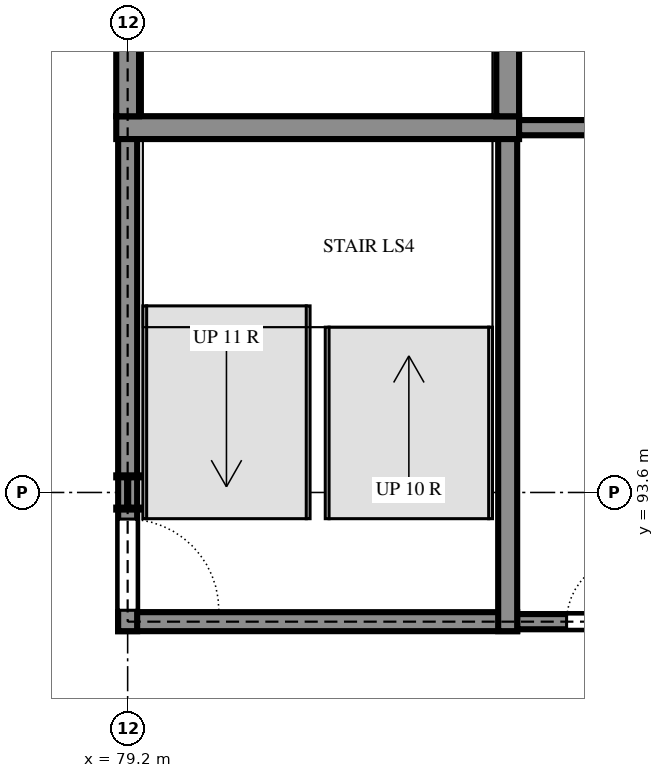
"""IFC4 building model, lengths in metres.
Left out: names, types, materials, properties, quantities, classifications, styles, units other than length and angle.
Written with IfcOpenShell. Run it as: python <this file> out.ifc"""

import sys

from ifc_helpers import new_model, si_unit, direction, frame, frame_2d, origin, origin_2d, place, context, subcontext, project, spatial, rectangle, i_section, extrude, element, fill, save


model = new_model("IFC4")
c1 = context("Model", 3, precision=1e-05, world=origin(), true_north=direction((0.0, 1.0)))
c2 = subcontext(c1, "Body", "Model", "MODEL_VIEW")
j1 = project(units=[si_unit("LENGTHUNIT", "METRE"), si_unit("PLANEANGLEUNIT", "RADIAN")], contexts=[c1])
p1 = place(None, origin())
s1 = spatial("IfcSite", under=j1, at=p1, CompositionType="ELEMENT")
p2 = place(p1, origin())
s2 = spatial("IfcBuilding", under=s1, at=p2, CompositionType="ELEMENT")
p3 = place(p2, frame((0.0, 0.0, 7.2)))
s3 = spatial("IfcBuildingStorey", under=s2, at=p3, CompositionType="ELEMENT", Elevation=7.2)
p4 = place(p3, frame((79.2, 93.6, 0.0), z_axis=(0.0, 0.0, 1.0), x_axis=(1.0, 0.0, 0.0)))
e1 = element("IfcColumn", 1, at=p4, inside=s3, PredefinedType="COLUMN", context=c2, shape_type="SweptSolid", body=[
    extrude(i_section(OverallWidth=0.3, OverallDepth=0.45, WebThickness=0.014, FlangeThickness=0.026, FilletRadius=0.027, at=origin_2d()), origin(), (0.0, 0.0, 1.0), 3.6),
])
p5 = place(p3, frame((79.075, 91.9, 0.0), z_axis=(0.0, 0.0, 1.0), x_axis=(1.0, 0.0, 0.0)))
e2 = element("IfcWall", 2, at=p5, inside=s3, PredefinedType="SHEAR", context=c2, shape_type="SweptSolid", body=[
    extrude(rectangle(XDim=5.25, YDim=0.25, at=frame_2d((2.625, 0.0))), origin(), (0.0, 0.0, 1.0), 3.6),
])
p6 = place(p3, frame((84.325, 91.9, 0.0), z_axis=(0.0, 0.0, 1.0), x_axis=(1.0, 0.0, 0.0)))
e3 = element("IfcWall", 3, at=p6, inside=s3, PredefinedType="SHEAR", context=c2, shape_type="SweptSolid", body=[
    extrude(rectangle(XDim=2.175, YDim=0.2, at=frame_2d((1.087, 0.0))), origin(), (0.0, 0.0, 1.0), 3.6),
])
p7 = place(p6, frame((0.65, 0.0, 0.0)))
e4 = element("IfcOpeningElement", 4, at=p7, cuts=e3, PredefinedType="OPENING", context=c2, shape_type="SweptSolid", body=[
    extrude(rectangle(XDim=0.85, YDim=2.1, at=frame_2d((0.425, 1.05))), frame((0.0, 0.11, 0.0), z_axis=(0.0, -1.0, 0.0), x_axis=(1.0, 0.0, 0.0)), (0.0, 0.0, 1.0), 0.22),
])
p8 = place(p3, frame((84.2, 91.775, 0.0), z_axis=(0.0, 0.0, 1.0), x_axis=(0.0, 1.0, 0.0)))
e5 = element("IfcWall", 5, at=p8, inside=s3, PredefinedType="SHEAR", context=c2, shape_type="SweptSolid", body=[
    extrude(rectangle(XDim=6.775, YDim=0.25, at=frame_2d((3.388, 0.0))), origin(), (0.0, 0.0, 1.0), 3.6),
])
p9 = place(p3, frame((79.2, 98.55, 0.0), z_axis=(0.0, 0.0, 1.0), x_axis=(0.0, -1.0, 0.0)))
e6 = element("IfcWall", 6, at=p9, inside=s3, PredefinedType="SHEAR", context=c2, shape_type="SweptSolid", body=[
    extrude(rectangle(XDim=6.775, YDim=0.25, at=frame_2d((3.388, 0.0))), origin(), (0.0, 0.0, 1.0), 3.6),
])
p10 = place(p9, frame((5.3, 0.0, 0.0)))
e7 = element("IfcOpeningElement", 7, at=p10, cuts=e6, PredefinedType="OPENING", context=c2, shape_type="SweptSolid", body=[
    extrude(rectangle(XDim=1.2, YDim=2.4, at=frame_2d((0.6, 1.2))), frame((0.0, 0.135, 0.0), z_axis=(0.0, -1.0, 0.0), x_axis=(1.0, 0.0, 0.0)), (0.0, 0.0, 1.0), 0.27),
])
p11 = place(p3, frame((84.35, 98.4, 0.0), z_axis=(0.0, 0.0, 1.0), x_axis=(-1.0, 0.0, 0.0)))
e8 = element("IfcWall", 8, at=p11, inside=s3, PredefinedType="SHEAR", context=c2, shape_type="SweptSolid", body=[
    extrude(rectangle(XDim=5.3, YDim=0.3, at=frame_2d((2.65, 0.0))), origin(), (0.0, 0.0, 1.0), 3.6),
])
p12 = place(p3, frame((84.35, 98.4, 0.0), z_axis=(0.0, 0.0, 1.0), x_axis=(1.0, 0.0, 0.0)))
e9 = element("IfcWall", 9, at=p12, inside=s3, PredefinedType="SHEAR", context=c2, shape_type="SweptSolid", body=[
    extrude(rectangle(XDim=2.15, YDim=0.2, at=frame_2d((1.075, 0.0))), origin(), (0.0, 0.0, 1.0), 3.6),
])
p13 = place(p3, frame((84.2, 98.55, 0.0), z_axis=(0.0, 0.0, 1.0), x_axis=(0.0, 1.0, 0.0)))
e10 = element("IfcWall", 10, at=p13, inside=s3, PredefinedType="SHEAR", context=c2, shape_type="SweptSolid", body=[
    extrude(rectangle(XDim=6.5, YDim=0.3, at=frame_2d((3.25, 0.0))), origin(), (0.0, 0.0, 1.0), 3.6),
])
p14 = place(p3, frame((79.2, 105.05, 0.0), z_axis=(0.0, 0.0, 1.0), x_axis=(0.0, -1.0, 0.0)))
e11 = element("IfcWall", 11, at=p14, inside=s3, PredefinedType="SHEAR", context=c2, shape_type="SweptSolid", body=[
    extrude(rectangle(XDim=6.5, YDim=0.3, at=frame_2d((3.25, 0.0))), origin(), (0.0, 0.0, 1.0), 3.6),
])
p15 = place(p14, frame((0.3, 0.0, 0.0)))
e12 = element("IfcOpeningElement", 12, at=p15, cuts=e11, PredefinedType="OPENING", context=c2, shape_type="SweptSolid", body=[
    extrude(rectangle(XDim=1.2, YDim=2.4, at=frame_2d((0.6, 1.2))), frame((0.0, 0.16, 0.0), z_axis=(0.0, -1.0, 0.0), x_axis=(1.0, 0.0, 0.0)), (0.0, 0.0, 1.0), 0.32),
])
p16 = place(p10, origin())
e13 = element("IfcDoor", 13, at=p16, inside=s3, OperationType="SINGLE_SWING_LEFT", PredefinedType="DOOR", context=c2, shape_type="SweptSolid", body=[
    extrude(rectangle(XDim=1.2, YDim=2.4, at=frame_2d((0.6, 1.2))), frame((0.0, 0.025, 0.0), z_axis=(0.0, -1.0, 0.0), x_axis=(1.0, 0.0, 0.0)), (0.0, 0.0, 1.0), 0.05),
])
fill(e7, e13)
p17 = place(p7, origin())
e14 = element("IfcDoor", 14, at=p17, inside=s3, OperationType="SINGLE_SWING_LEFT", PredefinedType="DOOR", context=c2, shape_type="SweptSolid", body=[
    extrude(rectangle(XDim=0.85, YDim=2.1, at=frame_2d((0.425, 1.05))), frame((0.0, 0.025, 0.0), z_axis=(0.0, -1.0, 0.0), x_axis=(1.0, 0.0, 0.0)), (0.0, 0.0, 1.0), 0.05),
])
fill(e4, e14)
save(model, sys.argv[1])
